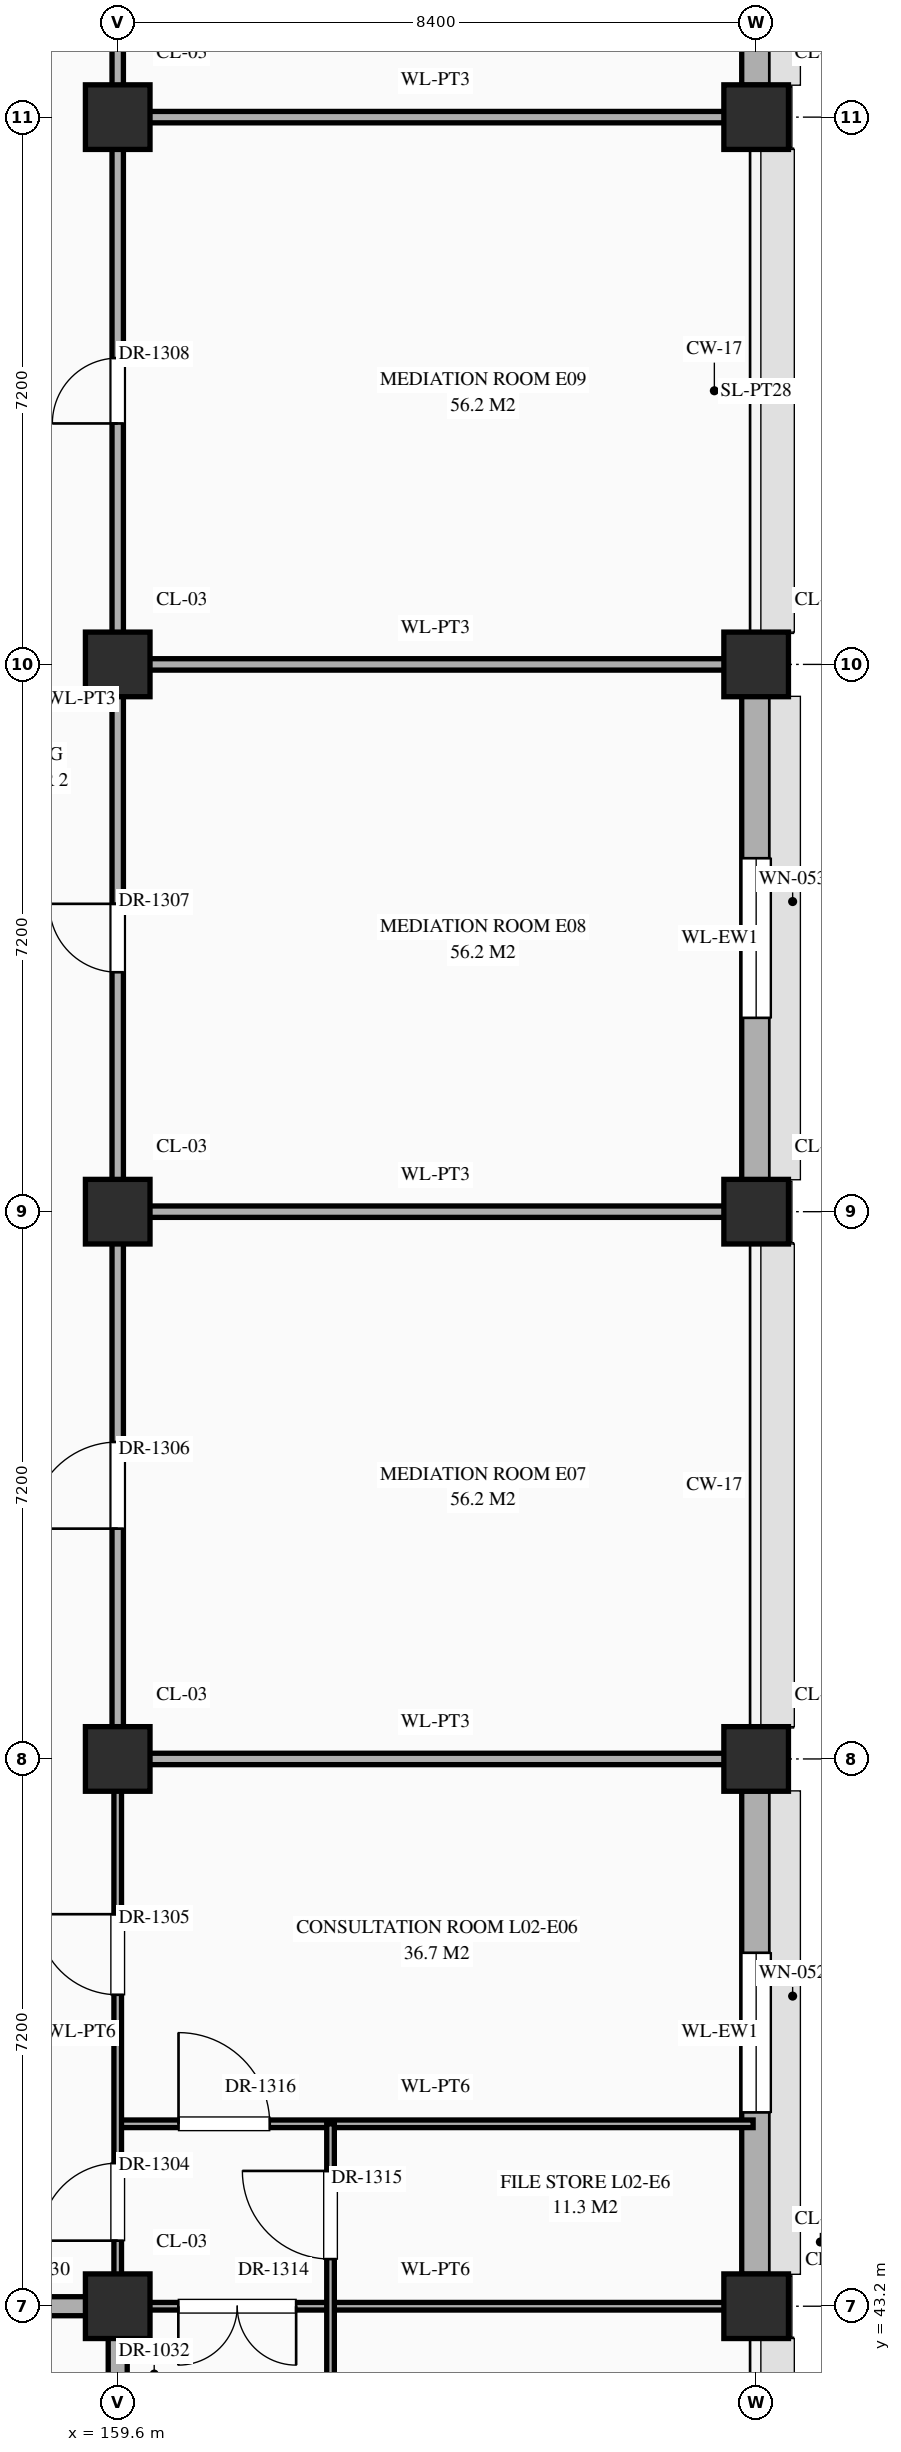
"""IFC4 building model, lengths in metres.
Left out: names, types, materials, properties, quantities, classifications, styles, units other than length and angle.
Written with IfcOpenShell. Run it as: python <this file> out.ifc"""

import sys

from ifc_helpers import new_model, si_unit, direction, frame, frame_2d, origin, origin_2d, place, context, subcontext, project, spatial, rectangle, extrude, element, fill, save


model = new_model("IFC4")
c1 = context("Model", 3, precision=1e-05, world=origin(), true_north=direction((0.0, 1.0)))
c2 = subcontext(c1, "Body", "Model", "MODEL_VIEW")
j1 = project(units=[si_unit("LENGTHUNIT", "METRE"), si_unit("PLANEANGLEUNIT", "RADIAN")], contexts=[c1])
p1 = place(None, origin())
s1 = spatial("IfcSite", under=j1, at=p1, CompositionType="ELEMENT")
p2 = place(p1, origin())
s2 = spatial("IfcBuilding", under=s1, at=p2, CompositionType="ELEMENT")
p3 = place(p2, frame((0.0, 0.0, 5.4)))
s3 = spatial("IfcBuildingStorey", under=s2, at=p3, CompositionType="ELEMENT", Elevation=5.4)
for number, where, z_axis, x_axis in (
    (1, (159.6, 43.2, 0.0), (0.0, 0.0, 1.0), (1.0, 0.0, 0.0)),
    (2, (159.6, 50.4, 0.0), (0.0, 0.0, 1.0), (1.0, 0.0, 0.0)),
    (3, (159.6, 57.6, 0.0), (0.0, 0.0, 1.0), (1.0, 0.0, 0.0)),
    (4, (159.6, 64.8, 0.0), (0.0, 0.0, 1.0), (1.0, 0.0, 0.0)),
    (5, (159.6, 72.0, 0.0), (0.0, 0.0, 1.0), (1.0, 0.0, 0.0)),
    (6, (168.0, 43.2, 0.0), (0.0, 0.0, 1.0), (1.0, 0.0, 0.0)),
    (7, (168.0, 50.4, 0.0), (0.0, 0.0, 1.0), (1.0, 0.0, 0.0)),
    (8, (168.0, 57.6, 0.0), (0.0, 0.0, 1.0), (1.0, 0.0, 0.0)),
    (9, (168.0, 64.8, 0.0), (0.0, 0.0, 1.0), (1.0, 0.0, 0.0)),
    (10, (168.0, 72.0, 0.0), (0.0, 0.0, 1.0), (1.0, 0.0, 0.0)),
):
    element("IfcColumn", number, at=place(p3, frame(where, z_axis=z_axis, x_axis=x_axis)), inside=s3, PredefinedType="COLUMN", context=c2, shape_type="SweptSolid", body=[
        extrude(rectangle(XDim=0.85, YDim=0.85, at=origin_2d()), origin(), (0.0, 0.0, 1.0), 5.4),
    ])
p4 = place(p3, frame((168.0, 43.62, 0.0), z_axis=(0.0, 0.0, 1.0), x_axis=(0.0, 1.0, 0.0)))
e11 = element("IfcWall", 11, at=p4, inside=s3, PredefinedType="STANDARD", context=c2, shape_type="SweptSolid", body=[
    extrude(rectangle(XDim=6.36, YDim=0.38, at=frame_2d((3.18, 0.0))), origin(), (0.0, 0.0, 1.0), 4.47),
])
p5 = place(p4, frame((2.13, 0.0, 0.85)))
e12 = element("IfcOpeningElement", 12, at=p5, cuts=e11, PredefinedType="OPENING", context=c2, shape_type="SweptSolid", body=[
    extrude(rectangle(XDim=2.1, YDim=1.2, at=frame_2d((1.05, 0.6))), frame((0.0, 0.202, 0.0), z_axis=(0.0, -1.0, 0.0), x_axis=(1.0, 0.0, 0.0)), (0.0, 0.0, 1.0), 0.404),
])
p6 = place(p3, frame((168.0, 58.02, 0.0), z_axis=(0.0, 0.0, 1.0), x_axis=(0.0, 1.0, 0.0)))
e13 = element("IfcWall", 13, at=p6, inside=s3, PredefinedType="STANDARD", context=c2, shape_type="SweptSolid", body=[
    extrude(rectangle(XDim=6.36, YDim=0.38, at=frame_2d((3.18, 0.0))), origin(), (0.0, 0.0, 1.0), 4.47),
])
p7 = place(p6, frame((2.13, 0.0, 0.85)))
e14 = element("IfcOpeningElement", 14, at=p7, cuts=e13, PredefinedType="OPENING", context=c2, shape_type="SweptSolid", body=[
    extrude(rectangle(XDim=2.1, YDim=1.56, at=frame_2d((1.05, 0.78))), frame((0.0, 0.202, 0.0), z_axis=(0.0, -1.0, 0.0), x_axis=(1.0, 0.0, 0.0)), (0.0, 0.0, 1.0), 0.404),
])
p8 = place(p3, frame((168.0, 72.42, 0.0), z_axis=(0.0, 0.0, 1.0), x_axis=(0.0, 1.0, 0.0)))
e15 = element("IfcWall", 15, at=p8, inside=s3, PredefinedType="STANDARD", context=c2, shape_type="SweptSolid", body=[
    extrude(rectangle(XDim=6.36, YDim=0.38, at=frame_2d((3.18, 0.0))), origin(), (0.0, 0.0, 1.0), 4.47),
])
p9 = place(p8, frame((2.13, 0.0, 0.85)))
e16 = element("IfcOpeningElement", 16, at=p9, cuts=e15, PredefinedType="OPENING", context=c2, shape_type="SweptSolid", body=[
    extrude(rectangle(XDim=2.1, YDim=1.92, at=frame_2d((1.05, 0.96))), frame((0.0, 0.202, 0.0), z_axis=(0.0, -1.0, 0.0), x_axis=(1.0, 0.0, 0.0)), (0.0, 0.0, 1.0), 0.404),
])
p10 = place(p3, frame((151.24, 43.2, 0.0), z_axis=(0.0, 0.0, 1.0), x_axis=(1.0, 0.0, 0.0)))
e17 = element("IfcWall", 17, at=p10, inside=s3, PredefinedType="STANDARD", context=c2, shape_type="SweptSolid", body=[
    extrude(rectangle(XDim=8.36, YDim=0.25, at=frame_2d((4.18, 0.0))), origin(), (0.0, 0.0, 1.0), 4.27),
])
p11 = place(p10, frame((6.238, 0.0, 0.0)))
e18 = element("IfcOpeningElement", 18, at=p11, cuts=e17, PredefinedType="OPENING", context=c2, shape_type="SweptSolid", body=[
    extrude(rectangle(XDim=1.1, YDim=2.2, at=frame_2d((0.55, 1.1))), frame((0.0, 0.137, 0.0), z_axis=(0.0, -1.0, 0.0), x_axis=(1.0, 0.0, 0.0)), (0.0, 0.0, 1.0), 0.274),
])
p12 = place(p10, frame((2.433, 0.0, 0.0)))
e19 = element("IfcOpeningElement", 19, at=p12, cuts=e17, PredefinedType="OPENING", context=c2, shape_type="SweptSolid", body=[
    extrude(rectangle(XDim=1.0, YDim=2.2, at=frame_2d((0.5, 1.1))), frame((0.0, 0.137, 0.0), z_axis=(0.0, -1.0, 0.0), x_axis=(1.0, 0.0, 0.0)), (0.0, 0.0, 1.0), 0.274),
])
p13 = place(p3, frame((159.6, 43.2, 0.0), z_axis=(0.0, 0.0, 1.0), x_axis=(1.0, 0.0, 0.0)))
e20 = element("IfcWall", 20, at=p13, inside=s3, PredefinedType="STANDARD", context=c2, shape_type="SweptSolid", body=[
    extrude(rectangle(XDim=8.36, YDim=0.1, at=frame_2d((4.18, 0.0))), origin(), (0.0, 0.0, 1.0), 4.27),
])
p14 = place(p13, frame((0.798, 0.0, 0.0)))
e21 = element("IfcOpeningElement", 21, at=p14, cuts=e20, PredefinedType="OPENING", context=c2, shape_type="SweptSolid", body=[
    extrude(rectangle(XDim=1.55, YDim=2.35, at=frame_2d((0.775, 1.175))), frame((0.0, 0.062, 0.0), z_axis=(0.0, -1.0, 0.0), x_axis=(1.0, 0.0, 0.0)), (0.0, 0.0, 1.0), 0.124),
])
p15 = place(p3, frame((159.6, 45.6, 0.0), z_axis=(0.0, 0.0, 1.0), x_axis=(1.0, 0.0, 0.0)))
e22 = element("IfcWall", 22, at=p15, inside=s3, PredefinedType="STANDARD", context=c2, shape_type="SweptSolid", body=[
    extrude(rectangle(XDim=8.36, YDim=0.1, at=frame_2d((4.18, 0.0))), origin(), (0.0, 0.0, 1.0), 5.12),
])
p16 = place(p15, frame((0.8, 0.0, 0.0)))
e23 = element("IfcOpeningElement", 23, at=p16, cuts=e22, PredefinedType="OPENING", context=c2, shape_type="SweptSolid", body=[
    extrude(rectangle(XDim=1.2, YDim=2.35, at=frame_2d((0.6, 1.175))), frame((0.0, 0.062, 0.0), z_axis=(0.0, -1.0, 0.0), x_axis=(1.0, 0.0, 0.0)), (0.0, 0.0, 1.0), 0.124),
])
for number, where, z_axis, x_axis in (
    (24, (159.6, 50.4, 0.0), (0.0, 0.0, 1.0), (1.0, 0.0, 0.0)),
    (25, (159.6, 57.6, 0.0), (0.0, 0.0, 1.0), (1.0, 0.0, 0.0)),
    (26, (159.6, 64.8, 0.0), (0.0, 0.0, 1.0), (1.0, 0.0, 0.0)),
    (27, (159.6, 72.0, 0.0), (0.0, 0.0, 1.0), (1.0, 0.0, 0.0)),
):
    element("IfcWall", number, at=place(p3, frame(where, z_axis=z_axis, x_axis=x_axis)), inside=s3, PredefinedType="STANDARD", context=c2, shape_type="SweptSolid", body=[
        extrude(rectangle(XDim=8.36, YDim=0.15, at=frame_2d((4.18, 0.0))), origin(), (0.0, 0.0, 1.0), 4.27),
    ])
p17 = place(p3, frame((159.6, 40.8, 0.0), z_axis=(0.0, 0.0, 1.0), x_axis=(0.0, 1.0, 0.0)))
e28 = element("IfcWall", 28, at=p17, inside=s3, PredefinedType="STANDARD", context=c2, shape_type="SweptSolid", body=[
    extrude(rectangle(XDim=2.4, YDim=0.25, at=frame_2d((1.2, 0.0))), origin(), (0.0, 0.0, 1.0), 4.37),
])
p18 = place(p17, frame((0.552, 0.0, 0.0)))
e29 = element("IfcOpeningElement", 29, at=p18, cuts=e28, PredefinedType="OPENING", context=c2, shape_type="SweptSolid", body=[
    extrude(rectangle(XDim=0.95, YDim=2.15, at=frame_2d((0.475, 1.075))), frame((0.0, 0.137, 0.0), z_axis=(0.0, -1.0, 0.0), x_axis=(1.0, 0.0, 0.0)), (0.0, 0.0, 1.0), 0.274),
])
p19 = place(p3, frame((159.6, 43.2, 0.0), z_axis=(0.0, 0.0, 1.0), x_axis=(0.0, 1.0, 0.0)))
e30 = element("IfcWall", 30, at=p19, inside=s3, PredefinedType="STANDARD", context=c2, shape_type="SweptSolid", body=[
    extrude(rectangle(XDim=7.2, YDim=0.1, at=frame_2d((3.6, 0.0))), origin(), (0.0, 0.0, 1.0), 4.37),
])
p20 = place(p19, frame((0.863, 0.0, 0.0)))
e31 = element("IfcOpeningElement", 31, at=p20, cuts=e30, PredefinedType="OPENING", context=c2, shape_type="SweptSolid", body=[
    extrude(rectangle(XDim=1.02, YDim=2.4, at=frame_2d((0.51, 1.2))), frame((0.0, 0.062, 0.0), z_axis=(0.0, -1.0, 0.0), x_axis=(1.0, 0.0, 0.0)), (0.0, 0.0, 1.0), 0.124),
])
p21 = place(p19, frame((4.097, 0.0, 0.0)))
e32 = element("IfcOpeningElement", 32, at=p21, cuts=e30, PredefinedType="OPENING", context=c2, shape_type="SweptSolid", body=[
    extrude(rectangle(XDim=1.06, YDim=2.4, at=frame_2d((0.53, 1.2))), frame((0.0, 0.062, 0.0), z_axis=(0.0, -1.0, 0.0), x_axis=(1.0, 0.0, 0.0)), (0.0, 0.0, 1.0), 0.124),
])
p22 = place(p3, frame((159.6, 50.4, 0.0), z_axis=(0.0, 0.0, 1.0), x_axis=(0.0, 1.0, 0.0)))
e33 = element("IfcWall", 33, at=p22, inside=s3, PredefinedType="STANDARD", context=c2, shape_type="SweptSolid", body=[
    extrude(rectangle(XDim=33.6, YDim=0.15, at=frame_2d((16.8, 0.0))), origin(), (0.0, 0.0, 1.0), 4.37),
])
p23 = place(p22, frame((30.942, 0.0, 0.0)))
e34 = element("IfcOpeningElement", 34, at=p23, cuts=e33, PredefinedType="OPENING", context=c2, shape_type="SweptSolid", body=[
    extrude(rectangle(XDim=0.86, YDim=2.1, at=frame_2d((0.43, 1.05))), frame((0.0, 0.087, 0.0), z_axis=(0.0, -1.0, 0.0), x_axis=(1.0, 0.0, 0.0)), (0.0, 0.0, 1.0), 0.174),
])
p24 = place(p22, frame((3.03, 0.0, 0.0)))
e35 = element("IfcOpeningElement", 35, at=p24, cuts=e33, PredefinedType="OPENING", context=c2, shape_type="SweptSolid", body=[
    extrude(rectangle(XDim=1.14, YDim=2.4, at=frame_2d((0.57, 1.2))), frame((0.0, 0.087, 0.0), z_axis=(0.0, -1.0, 0.0), x_axis=(1.0, 0.0, 0.0)), (0.0, 0.0, 1.0), 0.174),
])
p25 = place(p22, frame((10.35, 0.0, 0.0)))
e36 = element("IfcOpeningElement", 36, at=p25, cuts=e33, PredefinedType="OPENING", context=c2, shape_type="SweptSolid", body=[
    extrude(rectangle(XDim=0.9, YDim=2.15, at=frame_2d((0.45, 1.075))), frame((0.0, 0.087, 0.0), z_axis=(0.0, -1.0, 0.0), x_axis=(1.0, 0.0, 0.0)), (0.0, 0.0, 1.0), 0.174),
])
p26 = place(p22, frame((17.57, 0.0, 0.0)))
e37 = element("IfcOpeningElement", 37, at=p26, cuts=e33, PredefinedType="OPENING", context=c2, shape_type="SweptSolid", body=[
    extrude(rectangle(XDim=0.86, YDim=2.1, at=frame_2d((0.43, 1.05))), frame((0.0, 0.087, 0.0), z_axis=(0.0, -1.0, 0.0), x_axis=(1.0, 0.0, 0.0)), (0.0, 0.0, 1.0), 0.174),
])
p27 = place(p22, frame((24.74, 0.0, 0.0)))
e38 = element("IfcOpeningElement", 38, at=p27, cuts=e33, PredefinedType="OPENING", context=c2, shape_type="SweptSolid", body=[
    extrude(rectangle(XDim=0.92, YDim=2.15, at=frame_2d((0.46, 1.075))), frame((0.0, 0.087, 0.0), z_axis=(0.0, -1.0, 0.0), x_axis=(1.0, 0.0, 0.0)), (0.0, 0.0, 1.0), 0.174),
])
p28 = place(p3, frame((162.4, 33.6, 0.0), z_axis=(0.0, 0.0, 1.0), x_axis=(0.0, 1.0, 0.0)))
e39 = element("IfcWall", 39, at=p28, inside=s3, PredefinedType="STANDARD", context=c2, shape_type="SweptSolid", body=[
    extrude(rectangle(XDim=12.0, YDim=0.1, at=frame_2d((6.0, 0.0))), origin(), (0.0, 0.0, 1.0), 5.12),
])
p29 = place(p28, frame((0.7, 0.0, 0.0)))
e40 = element("IfcOpeningElement", 40, at=p29, cuts=e39, PredefinedType="OPENING", context=c2, shape_type="SweptSolid", body=[
    extrude(rectangle(XDim=1.0, YDim=2.25, at=frame_2d((0.5, 1.125))), frame((0.0, 0.062, 0.0), z_axis=(0.0, -1.0, 0.0), x_axis=(1.0, 0.0, 0.0)), (0.0, 0.0, 1.0), 0.124),
])
p30 = place(p28, frame((5.46, 0.0, 0.0)))
e41 = element("IfcOpeningElement", 41, at=p30, cuts=e39, PredefinedType="OPENING", context=c2, shape_type="SweptSolid", body=[
    extrude(rectangle(XDim=1.08, YDim=2.25, at=frame_2d((0.54, 1.125))), frame((0.0, 0.062, 0.0), z_axis=(0.0, -1.0, 0.0), x_axis=(1.0, 0.0, 0.0)), (0.0, 0.0, 1.0), 0.124),
])
p31 = place(p28, frame((10.22, 0.0, 0.0)))
e42 = element("IfcOpeningElement", 42, at=p31, cuts=e39, PredefinedType="OPENING", context=c2, shape_type="SweptSolid", body=[
    extrude(rectangle(XDim=1.16, YDim=2.3, at=frame_2d((0.58, 1.15))), frame((0.0, 0.062, 0.0), z_axis=(0.0, -1.0, 0.0), x_axis=(1.0, 0.0, 0.0)), (0.0, 0.0, 1.0), 0.124),
])
p32 = place(p5, origin())
e43 = element("IfcWindow", 43, at=p32, inside=s3, PartitioningType="SINGLE_PANEL", PredefinedType="WINDOW", context=c2, shape_type="SweptSolid", body=[
    extrude(rectangle(XDim=2.1, YDim=1.2, at=frame_2d((1.05, 0.6))), frame((0.0, 0.03, 0.0), z_axis=(0.0, -1.0, 0.0), x_axis=(1.0, 0.0, 0.0)), (0.0, 0.0, 1.0), 0.06),
])
fill(e12, e43)
p33 = place(p7, origin())
e44 = element("IfcWindow", 44, at=p33, inside=s3, PartitioningType="SINGLE_PANEL", PredefinedType="WINDOW", context=c2, shape_type="SweptSolid", body=[
    extrude(rectangle(XDim=2.1, YDim=1.56, at=frame_2d((1.05, 0.78))), frame((0.0, 0.03, 0.0), z_axis=(0.0, -1.0, 0.0), x_axis=(1.0, 0.0, 0.0)), (0.0, 0.0, 1.0), 0.06),
])
fill(e14, e44)
p34 = place(p20, origin())
e45 = element("IfcDoor", 45, at=p34, inside=s3, OperationType="SINGLE_SWING_LEFT", PredefinedType="DOOR", context=c2, shape_type="SweptSolid", body=[
    extrude(rectangle(XDim=1.02, YDim=2.4, at=frame_2d((0.51, 1.2))), frame((0.0, 0.025, 0.0), z_axis=(0.0, -1.0, 0.0), x_axis=(1.0, 0.0, 0.0)), (0.0, 0.0, 1.0), 0.05),
])
fill(e31, e45)
p35 = place(p21, origin())
e46 = element("IfcDoor", 46, at=p35, inside=s3, OperationType="SINGLE_SWING_RIGHT", PredefinedType="DOOR", context=c2, shape_type="SweptSolid", body=[
    extrude(rectangle(XDim=1.06, YDim=2.4, at=frame_2d((0.53, 1.2))), frame((0.0, 0.025, 0.0), z_axis=(0.0, -1.0, 0.0), x_axis=(1.0, 0.0, 0.0)), (0.0, 0.0, 1.0), 0.05),
])
fill(e32, e46)
p36 = place(p24, origin())
e47 = element("IfcDoor", 47, at=p36, inside=s3, OperationType="SINGLE_SWING_LEFT", PredefinedType="DOOR", context=c2, shape_type="SweptSolid", body=[
    extrude(rectangle(XDim=1.14, YDim=2.4, at=frame_2d((0.57, 1.2))), frame((0.0, 0.025, 0.0), z_axis=(0.0, -1.0, 0.0), x_axis=(1.0, 0.0, 0.0)), (0.0, 0.0, 1.0), 0.05),
])
fill(e35, e47)
p37 = place(p25, origin())
e48 = element("IfcDoor", 48, at=p37, inside=s3, OperationType="SINGLE_SWING_RIGHT", PredefinedType="DOOR", context=c2, shape_type="SweptSolid", body=[
    extrude(rectangle(XDim=0.9, YDim=2.15, at=frame_2d((0.45, 1.075))), frame((0.0, 0.025, 0.0), z_axis=(0.0, -1.0, 0.0), x_axis=(1.0, 0.0, 0.0)), (0.0, 0.0, 1.0), 0.05),
])
fill(e36, e48)
p38 = place(p26, origin())
e49 = element("IfcDoor", 49, at=p38, inside=s3, OperationType="SINGLE_SWING_LEFT", PredefinedType="DOOR", context=c2, shape_type="SweptSolid", body=[
    extrude(rectangle(XDim=0.86, YDim=2.1, at=frame_2d((0.43, 1.05))), frame((0.0, 0.025, 0.0), z_axis=(0.0, -1.0, 0.0), x_axis=(1.0, 0.0, 0.0)), (0.0, 0.0, 1.0), 0.05),
])
fill(e37, e49)
p39 = place(p14, frame((1.55, 0.0, 0.0), z_axis=(0.0, 0.0, 1.0), x_axis=(-1.0, 0.0, 0.0)))
e50 = element("IfcDoor", 50, at=p39, inside=s3, OperationType="DOUBLE_DOOR_SINGLE_SWING", PredefinedType="DOOR", context=c2, shape_type="SweptSolid", body=[
    extrude(rectangle(XDim=1.55, YDim=2.35, at=frame_2d((0.775, 1.175))), frame((0.0, 0.025, 0.0), z_axis=(0.0, -1.0, 0.0), x_axis=(1.0, 0.0, 0.0)), (0.0, 0.0, 1.0), 0.05),
])
fill(e21, e50)
p40 = place(p31, origin())
e51 = element("IfcDoor", 51, at=p40, inside=s3, OperationType="SINGLE_SWING_RIGHT", PredefinedType="DOOR", context=c2, shape_type="SweptSolid", body=[
    extrude(rectangle(XDim=1.16, YDim=2.3, at=frame_2d((0.58, 1.15))), frame((0.0, 0.025, 0.0), z_axis=(0.0, -1.0, 0.0), x_axis=(1.0, 0.0, 0.0)), (0.0, 0.0, 1.0), 0.05),
])
fill(e42, e51)
p41 = place(p16, origin())
e52 = element("IfcDoor", 52, at=p41, inside=s3, OperationType="SINGLE_SWING_LEFT", PredefinedType="DOOR", context=c2, shape_type="SweptSolid", body=[
    extrude(rectangle(XDim=1.2, YDim=2.35, at=frame_2d((0.6, 1.175))), frame((0.0, 0.025, 0.0), z_axis=(0.0, -1.0, 0.0), x_axis=(1.0, 0.0, 0.0)), (0.0, 0.0, 1.0), 0.05),
])
fill(e23, e52)
save(model, sys.argv[1])
